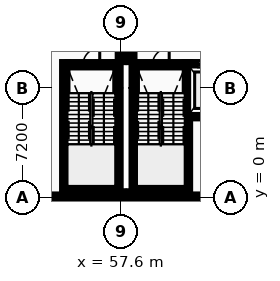
"""IFC4 building model, lengths in metres.
Left out: names, types, materials, properties, quantities, classifications, styles, units other than length and angle.
Written with IfcOpenShell. Run it as: python <this file> out.ifc"""

import sys

from ifc_helpers import new_model, si_unit, direction, frame, frame_2d, origin, origin_2d, place, context, subcontext, project, spatial, rectangle, i_section, extrude, element, fill, save


model = new_model("IFC4")
c1 = context("Model", 3, precision=1e-05, world=origin(), true_north=direction((0.0, 1.0)))
c2 = subcontext(c1, "Body", "Model", "MODEL_VIEW")
j1 = project(units=[si_unit("LENGTHUNIT", "METRE"), si_unit("PLANEANGLEUNIT", "RADIAN")], contexts=[c1])
p1 = place(None, origin())
s1 = spatial("IfcSite", under=j1, at=p1, CompositionType="ELEMENT")
p2 = place(p1, origin())
s2 = spatial("IfcBuilding", under=s1, at=p2, CompositionType="ELEMENT")
p3 = place(p2, frame((0.0, 0.0, 9.6)))
s3 = spatial("IfcBuildingStorey", under=s2, at=p3, CompositionType="ELEMENT", Elevation=9.6)
for number, where, z_axis, x_axis in (
    (1, (57.6, 0.0, 0.0), (0.0, 0.0, 1.0), (1.0, 0.0, 0.0)),
    (2, (58.32, 0.0, 0.0), (0.0, 0.0, 1.0), (1.0, 0.0, 0.0)),
):
    element("IfcColumn", number, at=place(p3, frame(where, z_axis=z_axis, x_axis=x_axis)), inside=s3, PredefinedType="COLUMN", context=c2, shape_type="SweptSolid", body=[
        extrude(i_section(OverallWidth=0.3, OverallDepth=0.36, WebThickness=0.012, FlangeThickness=0.022, FilletRadius=0.027, at=origin_2d()), origin(), (0.0, 0.0, 1.0), 4.4),
    ])
p4 = place(p3, frame((50.29, 0.0, 0.0), z_axis=(0.0, 0.0, 1.0), x_axis=(1.0, 0.0, 0.0)))
e3 = element("IfcWall", 3, at=p4, inside=s3, PredefinedType="STANDARD", context=c2, shape_type="SweptSolid", body=[
    extrude(rectangle(XDim=7.12, YDim=0.38, at=frame_2d((3.56, 0.0))), origin(), (0.0, 0.0, 1.0), 3.895),
])
p5 = place(p4, frame((1.502, 0.0, 0.95)))
e4 = element("IfcOpeningElement", 4, at=p5, cuts=e3, PredefinedType="OPENING", context=c2, shape_type="SweptSolid", body=[
    extrude(rectangle(XDim=1.268, YDim=1.332, at=frame_2d((0.634, 0.666))), frame((0.0, 0.2, 0.0), z_axis=(0.0, -1.0, 0.0), x_axis=(1.0, 0.0, 0.0)), (0.0, 0.0, 1.0), 0.4),
])
p6 = place(p4, frame((4.35, 0.0, 0.95)))
e5 = element("IfcOpeningElement", 5, at=p6, cuts=e3, PredefinedType="OPENING", context=c2, shape_type="SweptSolid", body=[
    extrude(rectangle(XDim=1.268, YDim=1.332, at=frame_2d((0.634, 0.666))), frame((0.0, 0.2, 0.0), z_axis=(0.0, -1.0, 0.0), x_axis=(1.0, 0.0, 0.0)), (0.0, 0.0, 1.0), 0.4),
])
p7 = place(p3, frame((57.6, -0.19, 0.0), z_axis=(0.0, 0.0, 1.0), x_axis=(0.0, 1.0, 0.0)))
e6 = element("IfcWall", 6, at=p7, inside=s3, PredefinedType="STANDARD", context=c2, shape_type="SweptSolid", body=[
    extrude(rectangle(XDim=0.59, YDim=0.38, at=frame_2d((0.295, 0.0))), origin(), (0.0, 0.0, 1.0), 4.2),
])
p8 = place(p3, frame((57.6, 8.9, 0.0), z_axis=(0.0, 0.0, 1.0), x_axis=(0.0, 1.0, 0.0)))
e7 = element("IfcWall", 7, at=p8, inside=s3, PredefinedType="STANDARD", context=c2, shape_type="SweptSolid", body=[
    extrude(rectangle(XDim=5.5, YDim=0.38, at=frame_2d((2.75, 0.0))), origin(), (0.0, 0.0, 1.0), 4.2),
])
p9 = place(p3, frame((58.51, 0.0, 0.0), z_axis=(0.0, 0.0, 1.0), x_axis=(1.0, 0.0, 0.0)))
e8 = element("IfcWall", 8, at=p9, inside=s3, PredefinedType="STANDARD", context=c2, shape_type="SweptSolid", body=[
    extrude(rectangle(XDim=6.29, YDim=0.38, at=frame_2d((3.145, 0.0))), origin(), (0.0, 0.0, 1.0), 3.895),
])
p10 = place(p3, frame((58.32, 0.4, 0.0), z_axis=(0.0, 0.0, 1.0), x_axis=(0.0, -1.0, 0.0)))
e9 = element("IfcWall", 9, at=p10, inside=s3, PredefinedType="STANDARD", context=c2, shape_type="SweptSolid", body=[
    extrude(rectangle(XDim=0.59, YDim=0.38, at=frame_2d((0.295, 0.0))), origin(), (0.0, 0.0, 1.0), 4.2),
])
p11 = place(p3, frame((58.32, 14.4, 0.0), z_axis=(0.0, 0.0, 1.0), x_axis=(0.0, -1.0, 0.0)))
e10 = element("IfcWall", 10, at=p11, inside=s3, PredefinedType="STANDARD", context=c2, shape_type="SweptSolid", body=[
    extrude(rectangle(XDim=5.5, YDim=0.38, at=frame_2d((2.75, 0.0))), origin(), (0.0, 0.0, 1.0), 4.2),
])
p12 = place(p3, frame((54.1, 0.575, 0.0), z_axis=(0.0, 0.0, 1.0), x_axis=(1.0, 0.0, 0.0)))
e11 = element("IfcWall", 11, at=p12, inside=s3, PredefinedType="SHEAR", context=c2, shape_type="SweptSolid", body=[
    extrude(rectangle(XDim=3.15, YDim=0.35, at=frame_2d((1.575, 0.0))), origin(), (0.0, 0.0, 1.0), 4.2),
])
p13 = place(p3, frame((54.1, 8.725, 0.0), z_axis=(0.0, 0.0, 1.0), x_axis=(1.0, 0.0, 0.0)))
e12 = element("IfcWall", 12, at=p13, inside=s3, PredefinedType="SHEAR", context=c2, shape_type="SweptSolid", body=[
    extrude(rectangle(XDim=3.15, YDim=0.35, at=frame_2d((1.575, 0.0))), origin(), (0.0, 0.0, 1.0), 4.2),
])
p14 = place(p13, frame((1.025, 0.0, 0.0)))
e13 = element("IfcOpeningElement", 13, at=p14, cuts=e12, PredefinedType="OPENING", context=c2, shape_type="SweptSolid", body=[
    extrude(rectangle(XDim=1.1, YDim=2.15, at=frame_2d((0.55, 1.075))), frame((0.0, 0.185, 0.0), z_axis=(0.0, -1.0, 0.0), x_axis=(1.0, 0.0, 0.0)), (0.0, 0.0, 1.0), 0.37),
])
for number, where, z_axis, x_axis in (
    (14, (53.925, 0.4, 0.0), (0.0, 0.0, 1.0), (0.0, 1.0, 0.0)),
    (15, (57.425, 0.4, 0.0), (0.0, 0.0, 1.0), (0.0, 1.0, 0.0)),
):
    element("IfcWall", number, at=place(p3, frame(where, z_axis=z_axis, x_axis=x_axis)), inside=s3, PredefinedType="SHEAR", context=c2, shape_type="SweptSolid", body=[
        extrude(rectangle(XDim=8.5, YDim=0.35, at=frame_2d((4.25, 0.0))), origin(), (0.0, 0.0, 1.0), 4.2),
    ])
p15 = place(p3, frame((58.67, 0.575, 0.0), z_axis=(0.0, 0.0, 1.0), x_axis=(1.0, 0.0, 0.0)))
e16 = element("IfcWall", 16, at=p15, inside=s3, PredefinedType="SHEAR", context=c2, shape_type="SweptSolid", body=[
    extrude(rectangle(XDim=3.15, YDim=0.35, at=frame_2d((1.575, 0.0))), origin(), (0.0, 0.0, 1.0), 4.2),
])
p16 = place(p3, frame((58.67, 8.725, 0.0), z_axis=(0.0, 0.0, 1.0), x_axis=(1.0, 0.0, 0.0)))
e17 = element("IfcWall", 17, at=p16, inside=s3, PredefinedType="SHEAR", context=c2, shape_type="SweptSolid", body=[
    extrude(rectangle(XDim=3.15, YDim=0.35, at=frame_2d((1.575, 0.0))), origin(), (0.0, 0.0, 1.0), 4.2),
])
p17 = place(p16, frame((1.025, 0.0, 0.0)))
e18 = element("IfcOpeningElement", 18, at=p17, cuts=e17, PredefinedType="OPENING", context=c2, shape_type="SweptSolid", body=[
    extrude(rectangle(XDim=1.1, YDim=2.15, at=frame_2d((0.55, 1.075))), frame((0.0, 0.185, 0.0), z_axis=(0.0, -1.0, 0.0), x_axis=(1.0, 0.0, 0.0)), (0.0, 0.0, 1.0), 0.37),
])
for number, where, z_axis, x_axis in (
    (19, (58.495, 0.4, 0.0), (0.0, 0.0, 1.0), (0.0, 1.0, 0.0)),
    (20, (61.995, 0.4, 0.0), (0.0, 0.0, 1.0), (0.0, 1.0, 0.0)),
):
    element("IfcWall", number, at=place(p3, frame(where, z_axis=z_axis, x_axis=x_axis)), inside=s3, PredefinedType="SHEAR", context=c2, shape_type="SweptSolid", body=[
        extrude(rectangle(XDim=8.5, YDim=0.35, at=frame_2d((4.25, 0.0))), origin(), (0.0, 0.0, 1.0), 4.2),
    ])
p18 = place(p3, frame((62.17, 5.375, 0.0), z_axis=(0.0, 0.0, 1.0), x_axis=(1.0, 0.0, 0.0)))
e21 = element("IfcWall", 21, at=p18, inside=s3, PredefinedType="SHEAR", context=c2, shape_type="SweptSolid", body=[
    extrude(rectangle(XDim=2.2, YDim=0.35, at=frame_2d((1.1, 0.0))), origin(), (0.0, 0.0, 1.0), 4.2),
])
p19 = place(p3, frame((62.17, 8.725, 0.0), z_axis=(0.0, 0.0, 1.0), x_axis=(1.0, 0.0, 0.0)))
e22 = element("IfcWall", 22, at=p19, inside=s3, PredefinedType="SHEAR", context=c2, shape_type="SweptSolid", body=[
    extrude(rectangle(XDim=2.2, YDim=0.35, at=frame_2d((1.1, 0.0))), origin(), (0.0, 0.0, 1.0), 4.2),
])
p20 = place(p19, frame((0.5, 0.0, 0.0)))
e23 = element("IfcOpeningElement", 23, at=p20, cuts=e22, PredefinedType="OPENING", context=c2, shape_type="SweptSolid", body=[
    extrude(rectangle(XDim=1.2, YDim=2.2, at=frame_2d((0.6, 1.1))), frame((0.0, 0.185, 0.0), z_axis=(0.0, -1.0, 0.0), x_axis=(1.0, 0.0, 0.0)), (0.0, 0.0, 1.0), 0.37),
])
p21 = place(p6, origin())
e24 = element("IfcWindow", 24, at=p21, inside=s3, PartitioningType="SINGLE_PANEL", PredefinedType="WINDOW", context=c2, shape_type="SweptSolid", body=[
    extrude(rectangle(XDim=1.268, YDim=1.332, at=frame_2d((0.634, 0.666))), frame((0.0, 0.03, 0.0), z_axis=(0.0, -1.0, 0.0), x_axis=(1.0, 0.0, 0.0)), (0.0, 0.0, 1.0), 0.06),
])
fill(e5, e24)
p22 = place(p14, frame((1.1, 0.0, 0.0), z_axis=(0.0, 0.0, 1.0), x_axis=(-1.0, 0.0, 0.0)))
e25 = element("IfcDoor", 25, at=p22, inside=s3, OperationType="SINGLE_SWING_RIGHT", PredefinedType="DOOR", context=c2, shape_type="SweptSolid", body=[
    extrude(rectangle(XDim=1.1, YDim=2.15, at=frame_2d((0.55, 1.075))), frame((0.0, 0.025, 0.0), z_axis=(0.0, -1.0, 0.0), x_axis=(1.0, 0.0, 0.0)), (0.0, 0.0, 1.0), 0.05),
])
fill(e13, e25)
p23 = place(p17, frame((1.1, 0.0, 0.0), z_axis=(0.0, 0.0, 1.0), x_axis=(-1.0, 0.0, 0.0)))
e26 = element("IfcDoor", 26, at=p23, inside=s3, OperationType="SINGLE_SWING_RIGHT", PredefinedType="DOOR", context=c2, shape_type="SweptSolid", body=[
    extrude(rectangle(XDim=1.1, YDim=2.15, at=frame_2d((0.55, 1.075))), frame((0.0, 0.025, 0.0), z_axis=(0.0, -1.0, 0.0), x_axis=(1.0, 0.0, 0.0)), (0.0, 0.0, 1.0), 0.05),
])
fill(e18, e26)
p24 = place(p20, origin())
e27 = element("IfcDoor", 27, at=p24, inside=s3, OperationType="SLIDING_TO_RIGHT", PredefinedType="DOOR", context=c2, shape_type="SweptSolid", body=[
    extrude(rectangle(XDim=1.2, YDim=2.2, at=frame_2d((0.6, 1.1))), frame((0.0, 0.025, 0.0), z_axis=(0.0, -1.0, 0.0), x_axis=(1.0, 0.0, 0.0)), (0.0, 0.0, 1.0), 0.05),
])
fill(e23, e27)
save(model, sys.argv[1])
